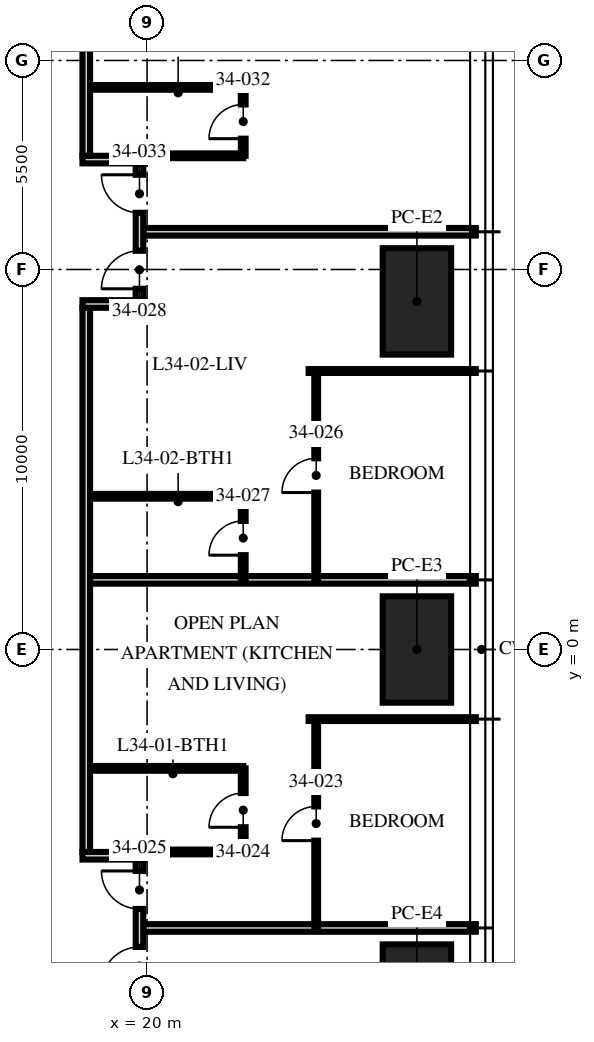
"""IFC4 building model, lengths in metres.
Left out: names, types, materials, properties, quantities, classifications, styles, units other than length and angle.
Written with IfcOpenShell. Run it as: python <this file> out.ifc"""

import sys

from ifc_helpers import new_model, si_unit, direction, frame, frame_2d, origin, origin_2d, place, context, subcontext, project, spatial, rectangle, extrude, element, fill, save


model = new_model("IFC4")
c1 = context("Model", 3, precision=1e-05, world=origin(), true_north=direction((0.0, 1.0)))
c2 = subcontext(c1, "Body", "Model", "MODEL_VIEW")
j1 = project(units=[si_unit("LENGTHUNIT", "METRE"), si_unit("PLANEANGLEUNIT", "RADIAN")], contexts=[c1])
p1 = place(None, origin())
s1 = spatial("IfcSite", under=j1, at=p1, CompositionType="ELEMENT")
p2 = place(p1, origin())
s2 = spatial("IfcBuilding", under=s1, at=p2, CompositionType="ELEMENT")
p3 = place(p2, frame((0.0, 0.0, 137.25)))
s3 = spatial("IfcBuildingStorey", under=s2, at=p3, CompositionType="ELEMENT", Elevation=137.25)
for number, where, z_axis, x_axis in (
    (1, (27.1, 9.16, 0.0), (0.0, 0.0, 1.0), (0.0, 1.0, 0.0)),
    (2, (27.1, 0.0, 0.0), (0.0, 0.0, 1.0), (0.0, 1.0, 0.0)),
    (3, (27.1, -9.16, 0.0), (0.0, 0.0, 1.0), (0.0, 1.0, 0.0)),
):
    element("IfcColumn", number, at=place(p3, frame(where, z_axis=z_axis, x_axis=x_axis)), inside=s3, PredefinedType="COLUMN", context=c2, shape_type="SweptSolid", body=[
        extrude(rectangle(XDim=2.8, YDim=1.8, at=origin_2d()), origin(), (0.0, 0.0, 1.0), 3.75),
    ])
p4 = place(p3, frame((19.9, -7.328, 0.0), z_axis=(0.0, 0.0, 1.0), x_axis=(1.0, 0.0, 0.0)))
e4 = element("IfcWall", 4, at=p4, inside=s3, PredefinedType="PARTITIONING", context=c2, shape_type="SweptSolid", body=[
    extrude(rectangle(XDim=8.75, YDim=0.2, at=frame_2d((4.375, 0.0))), origin(), (0.0, 0.0, 1.0), 2.81),
])
p5 = place(p3, frame((24.25, -1.832, 0.0), z_axis=(0.0, 0.0, 1.0), x_axis=(1.0, 0.0, 0.0)))
e5 = element("IfcWall", 5, at=p5, inside=s3, PredefinedType="PARTITIONING", context=c2, shape_type="SweptSolid", body=[
    extrude(rectangle(XDim=4.4, YDim=0.1, at=frame_2d((2.2, 0.0))), origin(), (0.0, 0.0, 1.0), 2.81),
])
p6 = place(p3, frame((18.5, 1.832, 0.0), z_axis=(0.0, 0.0, 1.0), x_axis=(1.0, 0.0, 0.0)))
e6 = element("IfcWall", 6, at=p6, inside=s3, PredefinedType="PARTITIONING", context=c2, shape_type="SweptSolid", body=[
    extrude(rectangle(XDim=10.15, YDim=0.2, at=frame_2d((5.075, 0.0))), origin(), (0.0, 0.0, 1.0), 2.81),
])
p7 = place(p3, frame((24.25, 7.328, 0.0), z_axis=(0.0, 0.0, 1.0), x_axis=(1.0, 0.0, 0.0)))
e7 = element("IfcWall", 7, at=p7, inside=s3, PredefinedType="PARTITIONING", context=c2, shape_type="SweptSolid", body=[
    extrude(rectangle(XDim=4.4, YDim=0.1, at=frame_2d((2.2, 0.0))), origin(), (0.0, 0.0, 1.0), 2.81),
])
p8 = place(p3, frame((19.9, 10.992, 0.0), z_axis=(0.0, 0.0, 1.0), x_axis=(1.0, 0.0, 0.0)))
e8 = element("IfcWall", 8, at=p8, inside=s3, PredefinedType="PARTITIONING", context=c2, shape_type="SweptSolid", body=[
    extrude(rectangle(XDim=8.75, YDim=0.2, at=frame_2d((4.375, 0.0))), origin(), (0.0, 0.0, 1.0), 2.81),
])
p9 = place(p3, frame((24.45, -7.328, 0.0), z_axis=(0.0, 0.0, 1.0), x_axis=(0.0, 1.0, 0.0)))
e9 = element("IfcWall", 9, at=p9, inside=s3, PredefinedType="PARTITIONING", context=c2, shape_type="SweptSolid", body=[
    extrude(rectangle(XDim=5.496, YDim=0.1, at=frame_2d((2.748, 0.0))), origin(), (0.0, 0.0, 1.0), 2.81),
])
p10 = place(p9, frame((2.298, 0.0, 0.0)))
e10 = element("IfcOpeningElement", 10, at=p10, cuts=e9, PredefinedType="OPENING", context=c2, shape_type="SweptSolid", body=[
    extrude(rectangle(XDim=0.9, YDim=2.1, at=frame_2d((0.45, 1.05))), frame((0.0, 0.06, 0.0), z_axis=(0.0, -1.0, 0.0), x_axis=(1.0, 0.0, 0.0)), (0.0, 0.0, 1.0), 0.12),
])
p11 = place(p3, frame((22.53, -5.328, 0.0), z_axis=(0.0, 0.0, 1.0), x_axis=(0.0, 1.0, 0.0)))
e11 = element("IfcWall", 11, at=p11, inside=s3, PredefinedType="PARTITIONING", context=c2, shape_type="SweptSolid", body=[
    extrude(rectangle(XDim=2.2, YDim=0.125, at=frame_2d((1.1, 0.0))), origin(), (0.0, 0.0, 1.0), 2.81),
])
p12 = place(p11, frame((0.65, 0.0, 0.0)))
e12 = element("IfcOpeningElement", 12, at=p12, cuts=e11, PredefinedType="OPENING", context=c2, shape_type="SweptSolid", body=[
    extrude(rectangle(XDim=0.9, YDim=2.1, at=frame_2d((0.45, 1.05))), frame((0.0, 0.073, 0.0), z_axis=(0.0, -1.0, 0.0), x_axis=(1.0, 0.0, 0.0)), (0.0, 0.0, 1.0), 0.145),
])
p13 = place(p3, frame((19.97, -5.328, 0.0), z_axis=(0.0, 0.0, 1.0), x_axis=(1.0, 0.0, 0.0)))
e13 = element("IfcWall", 13, at=p13, inside=s3, PredefinedType="PARTITIONING", context=c2, shape_type="SweptSolid", body=[
    extrude(rectangle(XDim=2.56, YDim=0.125, at=frame_2d((1.28, 0.0))), origin(), (0.0, 0.0, 1.0), 3.5),
])
p14 = place(p3, frame((18.5, -3.128, 0.0), z_axis=(0.0, 0.0, 1.0), x_axis=(1.0, 0.0, 0.0)))
e14 = element("IfcWall", 14, at=p14, inside=s3, PredefinedType="PARTITIONING", context=c2, shape_type="SweptSolid", body=[
    extrude(rectangle(XDim=4.03, YDim=0.125, at=frame_2d((2.015, 0.0))), origin(), (0.0, 0.0, 1.0), 3.5),
])
p15 = place(p3, frame((24.45, 1.832, 0.0), z_axis=(0.0, 0.0, 1.0), x_axis=(0.0, 1.0, 0.0)))
e15 = element("IfcWall", 15, at=p15, inside=s3, PredefinedType="PARTITIONING", context=c2, shape_type="SweptSolid", body=[
    extrude(rectangle(XDim=5.496, YDim=0.1, at=frame_2d((2.748, 0.0))), origin(), (0.0, 0.0, 1.0), 2.81),
])
p16 = place(p15, frame((2.298, 0.0, 0.0)))
e16 = element("IfcOpeningElement", 16, at=p16, cuts=e15, PredefinedType="OPENING", context=c2, shape_type="SweptSolid", body=[
    extrude(rectangle(XDim=0.9, YDim=2.1, at=frame_2d((0.45, 1.05))), frame((0.0, 0.06, 0.0), z_axis=(0.0, -1.0, 0.0), x_axis=(1.0, 0.0, 0.0)), (0.0, 0.0, 1.0), 0.12),
])
p17 = place(p3, frame((22.53, 1.832, 0.0), z_axis=(0.0, 0.0, 1.0), x_axis=(0.0, 1.0, 0.0)))
e17 = element("IfcWall", 17, at=p17, inside=s3, PredefinedType="PARTITIONING", context=c2, shape_type="SweptSolid", body=[
    extrude(rectangle(XDim=2.2, YDim=0.125, at=frame_2d((1.1, 0.0))), origin(), (0.0, 0.0, 1.0), 3.5),
])
p18 = place(p17, frame((0.65, 0.0, 0.0)))
e18 = element("IfcOpeningElement", 18, at=p18, cuts=e17, PredefinedType="OPENING", context=c2, shape_type="SweptSolid", body=[
    extrude(rectangle(XDim=0.9, YDim=2.1, at=frame_2d((0.45, 1.05))), frame((0.0, 0.073, 0.0), z_axis=(0.0, -1.0, 0.0), x_axis=(1.0, 0.0, 0.0)), (0.0, 0.0, 1.0), 0.145),
])
p19 = place(p3, frame((18.5, 4.032, 0.0), z_axis=(0.0, 0.0, 1.0), x_axis=(1.0, 0.0, 0.0)))
e19 = element("IfcWall", 19, at=p19, inside=s3, PredefinedType="PARTITIONING", context=c2, shape_type="SweptSolid", body=[
    extrude(rectangle(XDim=4.03, YDim=0.125, at=frame_2d((2.015, 0.0))), origin(), (0.0, 0.0, 1.0), 3.5),
])
p20 = place(p3, frame((22.53, 12.992, 0.0), z_axis=(0.0, 0.0, 1.0), x_axis=(0.0, 1.0, 0.0)))
e20 = element("IfcWall", 20, at=p20, inside=s3, PredefinedType="PARTITIONING", context=c2, shape_type="SweptSolid", body=[
    extrude(rectangle(XDim=1.8, YDim=0.125, at=frame_2d((0.9, 0.0))), origin(), (0.0, 0.0, 1.0), 2.81),
])
p21 = place(p20, frame((0.45, 0.0, 0.0)))
e21 = element("IfcOpeningElement", 21, at=p21, cuts=e20, PredefinedType="OPENING", context=c2, shape_type="SweptSolid", body=[
    extrude(rectangle(XDim=0.9, YDim=2.1, at=frame_2d((0.45, 1.05))), frame((0.0, 0.073, 0.0), z_axis=(0.0, -1.0, 0.0), x_axis=(1.0, 0.0, 0.0)), (0.0, 0.0, 1.0), 0.145),
])
p22 = place(p3, frame((19.97, 12.992, 0.0), z_axis=(0.0, 0.0, 1.0), x_axis=(1.0, 0.0, 0.0)))
e22 = element("IfcWall", 22, at=p22, inside=s3, PredefinedType="PARTITIONING", context=c2, shape_type="SweptSolid", body=[
    extrude(rectangle(XDim=2.56, YDim=0.125, at=frame_2d((1.28, 0.0))), origin(), (0.0, 0.0, 1.0), 3.5),
])
p23 = place(p3, frame((18.5, 14.792, 0.0), z_axis=(0.0, 0.0, 1.0), x_axis=(1.0, 0.0, 0.0)))
e23 = element("IfcWall", 23, at=p23, inside=s3, PredefinedType="PARTITIONING", context=c2, shape_type="SweptSolid", body=[
    extrude(rectangle(XDim=4.03, YDim=0.125, at=frame_2d((2.015, 0.0))), origin(), (0.0, 0.0, 1.0), 3.5),
])
p24 = place(p3, frame((18.3, -5.428, 0.0), z_axis=(0.0, 0.0, 1.0), x_axis=(1.0, 0.0, 0.0)))
e24 = element("IfcWall", 24, at=p24, inside=s3, PredefinedType="PARTITIONING", context=c2, shape_type="SweptSolid", body=[
    extrude(rectangle(XDim=1.6, YDim=0.2, at=frame_2d((0.8, 0.0))), origin(), (0.0, 0.0, 1.0), 3.5),
])
p25 = place(p3, frame((19.8, -9.128, 0.0), z_axis=(0.0, 0.0, 1.0), x_axis=(0.0, 1.0, 0.0)))
e25 = element("IfcWall", 25, at=p25, inside=s3, PredefinedType="PARTITIONING", context=c2, shape_type="SweptSolid", body=[
    extrude(rectangle(XDim=3.6, YDim=0.2, at=frame_2d((1.8, 0.0))), origin(), (0.0, 0.0, 1.0), 2.7),
])
p26 = place(p25, frame((2.3, 0.0, 0.0)))
e26 = element("IfcOpeningElement", 26, at=p26, cuts=e25, PredefinedType="OPENING", context=c2, shape_type="SweptSolid", body=[
    extrude(rectangle(XDim=1.0, YDim=2.2, at=frame_2d((0.5, 1.1))), frame((0.0, 0.11, 0.0), z_axis=(0.0, -1.0, 0.0), x_axis=(1.0, 0.0, 0.0)), (0.0, 0.0, 1.0), 0.22),
])
p27 = place(p25, frame((0.3, 0.0, 0.0)))
e27 = element("IfcOpeningElement", 27, at=p27, cuts=e25, PredefinedType="OPENING", context=c2, shape_type="SweptSolid", body=[
    extrude(rectangle(XDim=1.0, YDim=2.2, at=frame_2d((0.5, 1.1))), frame((0.0, 0.11, 0.0), z_axis=(0.0, -1.0, 0.0), x_axis=(1.0, 0.0, 0.0)), (0.0, 0.0, 1.0), 0.22),
])
p28 = place(p3, frame((18.4, -5.328, 0.0), z_axis=(0.0, 0.0, 1.0), x_axis=(0.0, 1.0, 0.0)))
e28 = element("IfcWall", 28, at=p28, inside=s3, PredefinedType="PARTITIONING", context=c2, shape_type="SweptSolid", body=[
    extrude(rectangle(XDim=14.32, YDim=0.2, at=frame_2d((7.16, 0.0))), origin(), (0.0, 0.0, 1.0), 2.7),
])
p29 = place(p3, frame((18.3, 9.092, 0.0), z_axis=(0.0, 0.0, 1.0), x_axis=(1.0, 0.0, 0.0)))
e29 = element("IfcWall", 29, at=p29, inside=s3, PredefinedType="PARTITIONING", context=c2, shape_type="SweptSolid", body=[
    extrude(rectangle(XDim=1.6, YDim=0.2, at=frame_2d((0.8, 0.0))), origin(), (0.0, 0.0, 1.0), 2.7),
])
p30 = place(p3, frame((18.3, 12.892, 0.0), z_axis=(0.0, 0.0, 1.0), x_axis=(1.0, 0.0, 0.0)))
e30 = element("IfcWall", 30, at=p30, inside=s3, PredefinedType="PARTITIONING", context=c2, shape_type="SweptSolid", body=[
    extrude(rectangle(XDim=1.6, YDim=0.2, at=frame_2d((0.8, 0.0))), origin(), (0.0, 0.0, 1.0), 3.5),
])
p31 = place(p3, frame((19.8, 9.192, 0.0), z_axis=(0.0, 0.0, 1.0), x_axis=(0.0, 1.0, 0.0)))
e31 = element("IfcWall", 31, at=p31, inside=s3, PredefinedType="PARTITIONING", context=c2, shape_type="SweptSolid", body=[
    extrude(rectangle(XDim=3.6, YDim=0.2, at=frame_2d((1.8, 0.0))), origin(), (0.0, 0.0, 1.0), 2.7),
])
p32 = place(p31, frame((0.3, 0.0, 0.0)))
e32 = element("IfcOpeningElement", 32, at=p32, cuts=e31, PredefinedType="OPENING", context=c2, shape_type="SweptSolid", body=[
    extrude(rectangle(XDim=1.0, YDim=2.2, at=frame_2d((0.5, 1.1))), frame((0.0, 0.11, 0.0), z_axis=(0.0, -1.0, 0.0), x_axis=(1.0, 0.0, 0.0)), (0.0, 0.0, 1.0), 0.22),
])
p33 = place(p31, frame((2.3, 0.0, 0.0)))
e33 = element("IfcOpeningElement", 33, at=p33, cuts=e31, PredefinedType="OPENING", context=c2, shape_type="SweptSolid", body=[
    extrude(rectangle(XDim=1.0, YDim=2.2, at=frame_2d((0.5, 1.1))), frame((0.0, 0.11, 0.0), z_axis=(0.0, -1.0, 0.0), x_axis=(1.0, 0.0, 0.0)), (0.0, 0.0, 1.0), 0.22),
])
p34 = place(p3, frame((18.4, 12.992, 0.0), z_axis=(0.0, 0.0, 1.0), x_axis=(0.0, 1.0, 0.0)))
e34 = element("IfcWall", 34, at=p34, inside=s3, PredefinedType="PARTITIONING", context=c2, shape_type="SweptSolid", body=[
    extrude(rectangle(XDim=3.708, YDim=0.2, at=frame_2d((1.854, 0.0))), origin(), (0.0, 0.0, 1.0), 2.81),
])
p35 = place(p10, origin())
e35 = element("IfcDoor", 35, at=p35, inside=s3, OperationType="SINGLE_SWING_LEFT", PredefinedType="DOOR", context=c2, shape_type="SweptSolid", body=[
    extrude(rectangle(XDim=0.9, YDim=2.1, at=frame_2d((0.45, 1.05))), frame((0.0, 0.025, 0.0), z_axis=(0.0, -1.0, 0.0), x_axis=(1.0, 0.0, 0.0)), (0.0, 0.0, 1.0), 0.05),
])
fill(e10, e35)
p36 = place(p12, origin())
e36 = element("IfcDoor", 36, at=p36, inside=s3, OperationType="SINGLE_SWING_LEFT", PredefinedType="DOOR", context=c2, shape_type="SweptSolid", body=[
    extrude(rectangle(XDim=0.9, YDim=2.1, at=frame_2d((0.45, 1.05))), frame((0.0, 0.025, 0.0), z_axis=(0.0, -1.0, 0.0), x_axis=(1.0, 0.0, 0.0)), (0.0, 0.0, 1.0), 0.05),
])
fill(e12, e36)
p37 = place(p26, origin())
e37 = element("IfcDoor", 37, at=p37, inside=s3, OperationType="SINGLE_SWING_RIGHT", PredefinedType="DOOR", context=c2, shape_type="SweptSolid", body=[
    extrude(rectangle(XDim=1.0, YDim=2.2, at=frame_2d((0.5, 1.1))), frame((0.0, 0.025, 0.0), z_axis=(0.0, -1.0, 0.0), x_axis=(1.0, 0.0, 0.0)), (0.0, 0.0, 1.0), 0.05),
])
fill(e26, e37)
p38 = place(p16, origin())
e38 = element("IfcDoor", 38, at=p38, inside=s3, OperationType="SINGLE_SWING_LEFT", PredefinedType="DOOR", context=c2, shape_type="SweptSolid", body=[
    extrude(rectangle(XDim=0.9, YDim=2.1, at=frame_2d((0.45, 1.05))), frame((0.0, 0.025, 0.0), z_axis=(0.0, -1.0, 0.0), x_axis=(1.0, 0.0, 0.0)), (0.0, 0.0, 1.0), 0.05),
])
fill(e16, e38)
p39 = place(p18, origin())
e39 = element("IfcDoor", 39, at=p39, inside=s3, OperationType="SINGLE_SWING_LEFT", PredefinedType="DOOR", context=c2, shape_type="SweptSolid", body=[
    extrude(rectangle(XDim=0.9, YDim=2.1, at=frame_2d((0.45, 1.05))), frame((0.0, 0.025, 0.0), z_axis=(0.0, -1.0, 0.0), x_axis=(1.0, 0.0, 0.0)), (0.0, 0.0, 1.0), 0.05),
])
fill(e18, e39)
p40 = place(p32, origin())
e40 = element("IfcDoor", 40, at=p40, inside=s3, OperationType="SINGLE_SWING_LEFT", PredefinedType="DOOR", context=c2, shape_type="SweptSolid", body=[
    extrude(rectangle(XDim=1.0, YDim=2.2, at=frame_2d((0.5, 1.1))), frame((0.0, 0.025, 0.0), z_axis=(0.0, -1.0, 0.0), x_axis=(1.0, 0.0, 0.0)), (0.0, 0.0, 1.0), 0.05),
])
fill(e32, e40)
p41 = place(p21, origin())
e41 = element("IfcDoor", 41, at=p41, inside=s3, OperationType="SINGLE_SWING_LEFT", PredefinedType="DOOR", context=c2, shape_type="SweptSolid", body=[
    extrude(rectangle(XDim=0.9, YDim=2.1, at=frame_2d((0.45, 1.05))), frame((0.0, 0.025, 0.0), z_axis=(0.0, -1.0, 0.0), x_axis=(1.0, 0.0, 0.0)), (0.0, 0.0, 1.0), 0.05),
])
fill(e21, e41)
p42 = place(p33, origin())
e42 = element("IfcDoor", 42, at=p42, inside=s3, OperationType="SINGLE_SWING_RIGHT", PredefinedType="DOOR", context=c2, shape_type="SweptSolid", body=[
    extrude(rectangle(XDim=1.0, YDim=2.2, at=frame_2d((0.5, 1.1))), frame((0.0, 0.025, 0.0), z_axis=(0.0, -1.0, 0.0), x_axis=(1.0, 0.0, 0.0)), (0.0, 0.0, 1.0), 0.05),
])
fill(e33, e42)
p43 = place(p27, origin())
e43 = element("IfcDoor", 43, at=p43, inside=s3, OperationType="SINGLE_SWING_LEFT", PredefinedType="DOOR", context=c2, shape_type="SweptSolid", body=[
    extrude(rectangle(XDim=1.0, YDim=2.2, at=frame_2d((0.5, 1.1))), frame((0.0, 0.025, 0.0), z_axis=(0.0, -1.0, 0.0), x_axis=(1.0, 0.0, 0.0)), (0.0, 0.0, 1.0), 0.05),
])
fill(e27, e43)
save(model, sys.argv[1])
